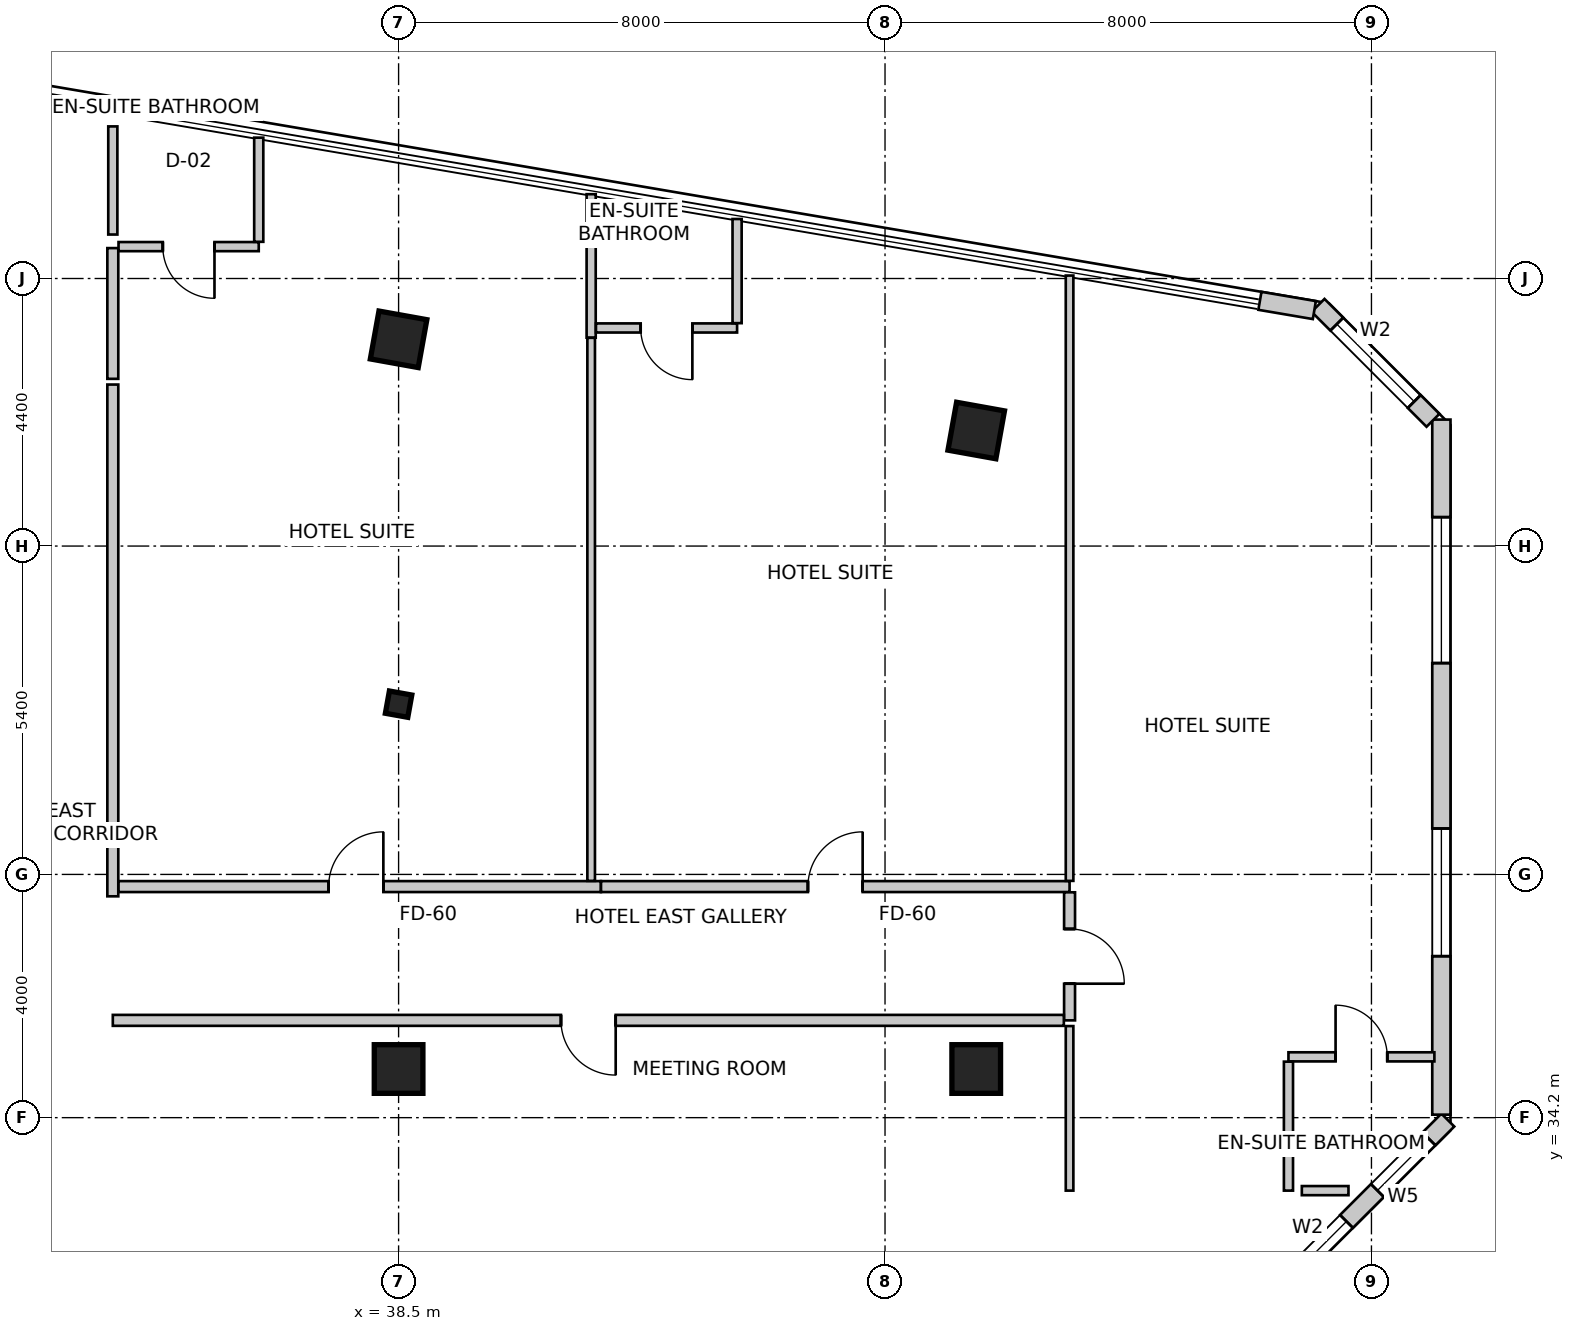
"""IFC4 building model, lengths in metres.
Left out: names, types, materials, properties, quantities, classifications, styles, units other than length and angle.
Written with IfcOpenShell. Run it as: python <this file> out.ifc"""

import sys

from ifc_helpers import new_model, si_unit, direction, frame, frame_2d, origin, origin_2d, place, context, subcontext, project, spatial, rectangle, i_section, extrude, source, transform, mapped, element, fill, save


model = new_model("IFC4")
c1 = context("Model", 3, precision=1e-05, world=origin(), true_north=direction((0.0, 1.0)))
c2 = subcontext(c1, "Body", "Model", "MODEL_VIEW")
j1 = project(units=[si_unit("LENGTHUNIT", "METRE"), si_unit("PLANEANGLEUNIT", "RADIAN")], contexts=[c1])
p1 = place(None, origin())
s1 = spatial("IfcSite", under=j1, at=p1, CompositionType="ELEMENT")
p2 = place(p1, origin())
s2 = spatial("IfcBuilding", under=s1, at=p2, CompositionType="ELEMENT")
p3 = place(p2, frame((0.0, 0.0, 150.2)))
s3 = spatial("IfcBuildingStorey", under=s2, at=p3, CompositionType="ELEMENT", Elevation=150.2)
m1 = source(origin(), c2, "Body", "SweptSolid", [
    extrude(rectangle(XDim=0.8, YDim=0.8, at=origin_2d()), origin(), (0.0, 0.0, 1.0), 3.6),
])
for number, where, z_axis, x_axis in (
    (1, (38.5, 47.0, 0.0), (0.0, 0.0, 1.0), (0.984, -0.177, 0.0)),
    (2, (48.0, 45.5, 0.0), (0.0, 0.0, 1.0), (0.984, -0.177, 0.0)),
    (3, (38.5, 35.0, 0.0), (0.0, 0.0, 1.0), (1.0, 0.0, 0.0)),
    (4, (48.0, 35.0, 0.0), (0.0, 0.0, 1.0), (1.0, 0.0, 0.0)),
):
    element("IfcColumn", number, at=place(p3, frame(where, z_axis=z_axis, x_axis=x_axis)), inside=s3, PredefinedType="COLUMN", context=c2, shape_type="MappedRepresentation", body=[
        mapped(m1, transform((0.0, 0.0, 0.0), scale=1.0)),
    ])
m2 = source(origin(), c2, "Body", "SweptSolid", [
    extrude(i_section(OverallWidth=0.374, OverallDepth=0.372, WebThickness=0.016, FlangeThickness=0.026, FilletRadius=0.015, at=origin_2d()), origin(), (0.0, 0.0, 1.0), 3.6),
])
p4 = place(p3, frame((38.5, 41.0, 0.0), z_axis=(0.0, 0.0, 1.0), x_axis=(0.984195607969, -0.17708474032, 0.0)))
e5 = element("IfcColumn", 5, at=p4, inside=s3, PredefinedType="COLUMN", context=c2, shape_type="MappedRepresentation", body=[
    mapped(m2, transform((0.0, 0.0, 0.0), scale=1.0)),
])
p5 = place(p3, frame((52.476, 30.88, 0.0), z_axis=(0.0, 0.0, 1.0), x_axis=(0.707106781187, 0.707106781187, 0.0)))
e6 = element("IfcWall", 6, at=p5, inside=s3, PredefinedType="SOLIDWALL", context=c2, shape_type="SweptSolid", body=[
    extrude(rectangle(XDim=4.639, YDim=0.3, at=frame_2d((2.319, 0.0))), origin(), (0.0, 0.0, 1.0), 3.35),
])
m3 = source(origin(), c2, "Body", "SweptSolid", [
    extrude(rectangle(XDim=1.8, YDim=2.1, at=frame_2d((0.9, 1.05))), frame((0.0, 0.16, 0.0), z_axis=(0.0, -1.0, 0.0), x_axis=(1.0, 0.0, 0.0)), (0.0, 0.0, 1.0), 0.32),
])
p6 = place(p5, frame((0.482, 0.0, 0.85)))
e7 = element("IfcOpeningElement", 7, at=p6, cuts=e6, PredefinedType="OPENING", context=c2, shape_type="MappedRepresentation", body=[
    mapped(m3, transform((0.0, 0.0, 0.0), scale=1.0)),
])
m4 = source(origin(), c2, "Body", "SweptSolid", [
    extrude(rectangle(XDim=1.2, YDim=1.6, at=frame_2d((0.6, 0.8))), frame((0.0, 0.16, 0.0), z_axis=(0.0, -1.0, 0.0), x_axis=(1.0, 0.0, 0.0)), (0.0, 0.0, 1.0), 0.32),
])
p7 = place(p5, frame((3.001, 0.0, 0.85)))
e8 = element("IfcOpeningElement", 8, at=p7, cuts=e6, PredefinedType="OPENING", context=c2, shape_type="MappedRepresentation", body=[
    mapped(m4, transform((0.0, 0.0, 0.0), scale=1.0)),
])
p8 = place(p3, frame((55.65, 34.249, 0.0), z_axis=(0.0, 0.0, 1.0), x_axis=(0.0, 1.0, 0.0)))
e9 = element("IfcWall", 9, at=p8, inside=s3, PredefinedType="SOLIDWALL", context=c2, shape_type="SweptSolid", body=[
    extrude(rectangle(XDim=11.431, YDim=0.3, at=frame_2d((5.715, 0.0))), origin(), (0.0, 0.0, 1.0), 3.35),
])
m5 = source(origin(), c2, "Body", "SweptSolid", [
    extrude(rectangle(XDim=2.1, YDim=2.0, at=frame_2d((1.05, 1.0))), frame((0.0, 0.16, 0.0), z_axis=(0.0, -1.0, 0.0), x_axis=(1.0, 0.0, 0.0)), (0.0, 0.0, 1.0), 0.32),
])
p9 = place(p8, frame((2.606, 0.0, 0.85)))
e10 = element("IfcOpeningElement", 10, at=p9, cuts=e9, PredefinedType="OPENING", context=c2, shape_type="MappedRepresentation", body=[
    mapped(m5, transform((0.0, 0.0, 0.0), scale=1.0)),
])
m6 = source(origin(), c2, "Body", "SweptSolid", [
    extrude(rectangle(XDim=2.4, YDim=2.2, at=frame_2d((1.2, 1.1))), frame((0.0, 0.16, 0.0), z_axis=(0.0, -1.0, 0.0), x_axis=(1.0, 0.0, 0.0)), (0.0, 0.0, 1.0), 0.32),
])
p10 = place(p8, frame((7.426, 0.0, 0.85)))
e11 = element("IfcOpeningElement", 11, at=p10, cuts=e9, PredefinedType="OPENING", context=c2, shape_type="MappedRepresentation", body=[
    mapped(m6, transform((0.0, 0.0, 0.0), scale=1.0)),
])
p11 = place(p3, frame((55.512, 45.668, 0.0), z_axis=(0.0, 0.0, 1.0), x_axis=(-0.707152443695, 0.707061115729, 0.0)))
e12 = element("IfcWall", 12, at=p11, inside=s3, PredefinedType="SOLIDWALL", context=c2, shape_type="SweptSolid", body=[
    extrude(rectangle(XDim=2.673, YDim=0.3, at=frame_2d((1.337, 0.0))), origin(), (0.0, 0.0, 1.0), 3.35),
])
p12 = place(p11, frame((0.437, 0.0, 0.85)))
e13 = element("IfcOpeningElement", 13, at=p12, cuts=e12, PredefinedType="OPENING", context=c2, shape_type="MappedRepresentation", body=[
    mapped(m3, transform((0.0, 0.0, 0.0), scale=1.0)),
])
p13 = place(p3, frame((53.561, 47.48, 0.0), z_axis=(0.0, 0.0, 1.0), x_axis=(-0.985836300899, 0.167710428506, 0.0)))
e14 = element("IfcWall", 14, at=p13, inside=s3, PredefinedType="SOLIDWALL", context=c2, shape_type="SweptSolid", body=[
    extrude(rectangle(XDim=0.908, YDim=0.3, at=frame_2d((0.454, 0.0))), origin(), (0.0, 0.0, 1.0), 3.35),
])
p14 = place(p3, frame((33.8, 48.5, 0.0), z_axis=(0.0, 0.0, 1.0), x_axis=(0.0, -1.0, 0.0)))
e15 = element("IfcWall", 15, at=p14, inside=s3, PredefinedType="PARTITIONING", context=c2, shape_type="SweptSolid", body=[
    extrude(rectangle(XDim=2.15, YDim=0.18, at=frame_2d((1.075, 0.0))), origin(), (0.0, 0.0, 1.0), 2.492),
])
p15 = place(p3, frame((33.8, 46.256, 0.0), z_axis=(0.0, 0.0, 1.0), x_axis=(0.0, -1.0, 0.0)))
e16 = element("IfcWall", 16, at=p15, inside=s3, PredefinedType="PARTITIONING", context=c2, shape_type="SweptSolid", body=[
    extrude(rectangle(XDim=8.416, YDim=0.18, at=frame_2d((4.208, 0.0))), origin(), (0.0, 0.0, 1.0), 2.879),
])
p16 = place(p3, frame((33.894, 38.0, 0.0), z_axis=(0.0, 0.0, 1.0), x_axis=(1.0, 0.0, 0.0)))
e17 = element("IfcWall", 17, at=p16, inside=s3, PredefinedType="PARTITIONING", context=c2, shape_type="SweptSolid", body=[
    extrude(rectangle(XDim=7.933, YDim=0.18, at=frame_2d((3.966, 0.0))), origin(), (0.0, 0.0, 1.0), 2.803),
])
m7 = source(origin(), c2, "Body", "SweptSolid", [
    extrude(rectangle(XDim=0.9, YDim=2.15, at=frame_2d((0.45, 1.075))), frame((0.0, 0.1, 0.0), z_axis=(0.0, -1.0, 0.0), x_axis=(1.0, 0.0, 0.0)), (0.0, 0.0, 1.0), 0.2),
])
p17 = place(p16, frame((3.455, 0.0, 0.0)))
e18 = element("IfcOpeningElement", 18, at=p17, cuts=e17, PredefinedType="OPENING", context=c2, shape_type="MappedRepresentation", body=[
    mapped(m7, transform((0.0, 0.0, 0.0), scale=1.0)),
])
p18 = place(p3, frame((41.829, 38.0, 0.0), z_axis=(0.0, 0.0, 1.0), x_axis=(1.0, 0.0, 0.0)))
e19 = element("IfcWall", 19, at=p18, inside=s3, PredefinedType="PARTITIONING", context=c2, shape_type="SweptSolid", body=[
    extrude(rectangle(XDim=7.706, YDim=0.18, at=frame_2d((3.853, 0.0))), origin(), (0.0, 0.0, 1.0), 2.803),
])
p19 = place(p18, frame((3.403, 0.0, 0.0)))
e20 = element("IfcOpeningElement", 20, at=p19, cuts=e19, PredefinedType="OPENING", context=c2, shape_type="MappedRepresentation", body=[
    mapped(m7, transform((0.0, 0.0, 0.0), scale=1.0)),
])
p20 = place(p3, frame((49.535, 37.906, 0.0), z_axis=(0.0, 0.0, 1.0), x_axis=(0.0, -1.0, 0.0)))
e21 = element("IfcWall", 21, at=p20, inside=s3, PredefinedType="PARTITIONING", context=c2, shape_type="SweptSolid", body=[
    extrude(rectangle(XDim=2.106, YDim=0.18, at=frame_2d((1.053, 0.0))), origin(), (0.0, 0.0, 1.0), 3.35),
])
p21 = place(p20, frame((0.603, 0.0, 0.0)))
e22 = element("IfcOpeningElement", 22, at=p21, cuts=e21, PredefinedType="OPENING", context=c2, shape_type="MappedRepresentation", body=[
    mapped(m7, transform((0.0, 0.0, 0.0), scale=1.0)),
])
p22 = place(p3, frame((49.441, 35.8, 0.0), z_axis=(0.0, 0.0, 1.0), x_axis=(-1.0, 0.0, 0.0)))
e23 = element("IfcWall", 23, at=p22, inside=s3, PredefinedType="PARTITIONING", context=c2, shape_type="SweptSolid", body=[
    extrude(rectangle(XDim=15.641, YDim=0.18, at=frame_2d((7.82, 0.0))), origin(), (0.0, 0.0, 1.0), 2.803),
])
p23 = place(p22, frame((7.371, 0.0, 0.0)))
e24 = element("IfcOpeningElement", 24, at=p23, cuts=e23, PredefinedType="OPENING", context=c2, shape_type="MappedRepresentation", body=[
    mapped(m7, transform((0.0, 0.0, 0.0), scale=1.0)),
])
p24 = place(p3, frame((36.2, 48.524, 0.0), z_axis=(0.0, 0.0, 1.0), x_axis=(-1.0, 0.0, 0.0)))
e25 = element("IfcWall", 25, at=p24, inside=s3, PredefinedType="PARTITIONING", context=c2, shape_type="SweptSolid", body=[
    extrude(rectangle(XDim=2.306, YDim=0.15, at=frame_2d((1.153, 0.0))), origin(), (0.0, 0.0, 1.0), 3.35),
])
m8 = source(origin(), c2, "Body", "SweptSolid", [
    extrude(rectangle(XDim=0.85, YDim=2.15, at=frame_2d((0.425, 1.075))), frame((0.0, 0.085, 0.0), z_axis=(0.0, -1.0, 0.0), x_axis=(1.0, 0.0, 0.0)), (0.0, 0.0, 1.0), 0.17),
])
p25 = place(p24, frame((0.728, 0.0, 0.0)))
e26 = element("IfcOpeningElement", 26, at=p25, cuts=e25, PredefinedType="OPENING", context=c2, shape_type="MappedRepresentation", body=[
    mapped(m8, transform((0.0, 0.0, 0.0), scale=1.0)),
])
p26 = place(p3, frame((36.2, 50.316, 0.0), z_axis=(0.0, 0.0, 1.0), x_axis=(0.0, -1.0, 0.0)))
e27 = element("IfcWall", 27, at=p26, inside=s3, PredefinedType="PARTITIONING", context=c2, shape_type="SweptSolid", body=[
    extrude(rectangle(XDim=1.713, YDim=0.15, at=frame_2d((0.856, 0.0))), origin(), (0.0, 0.0, 1.0), 3.35),
])
p27 = place(p3, frame((41.667, 49.387, 0.0), z_axis=(0.0, 0.0, 1.0), x_axis=(0.0, -1.0, 0.0)))
e28 = element("IfcWall", 28, at=p27, inside=s3, PredefinedType="PARTITIONING", context=c2, shape_type="SweptSolid", body=[
    extrude(rectangle(XDim=2.36, YDim=0.15, at=frame_2d((1.18, 0.0))), origin(), (0.0, 0.0, 1.0), 3.35),
])
p28 = place(p3, frame((41.667, 47.025, 0.0), z_axis=(0.0, 0.0, 1.0), x_axis=(0.0, -1.0, 0.0)))
e29 = element("IfcWall", 29, at=p28, inside=s3, PredefinedType="PARTITIONING", context=c2, shape_type="SweptSolid", body=[
    extrude(rectangle(XDim=8.931, YDim=0.125, at=frame_2d((4.465, 0.0))), origin(), (0.0, 0.0, 1.0), 2.492),
])
p29 = place(p3, frame((44.067, 47.187, 0.0), z_axis=(0.0, 0.0, 1.0), x_axis=(-1.0, 0.0, 0.0)))
e30 = element("IfcWall", 30, at=p29, inside=s3, PredefinedType="PARTITIONING", context=c2, shape_type="SweptSolid", body=[
    extrude(rectangle(XDim=2.321, YDim=0.15, at=frame_2d((1.16, 0.0))), origin(), (0.0, 0.0, 1.0), 3.35),
])
p30 = place(p29, frame((0.736, 0.0, 0.0)))
e31 = element("IfcOpeningElement", 31, at=p30, cuts=e30, PredefinedType="OPENING", context=c2, shape_type="MappedRepresentation", body=[
    mapped(m8, transform((0.0, 0.0, 0.0), scale=1.0)),
])
p31 = place(p3, frame((44.067, 48.979, 0.0), z_axis=(0.0, 0.0, 1.0), x_axis=(0.0, -1.0, 0.0)))
e32 = element("IfcWall", 32, at=p31, inside=s3, PredefinedType="PARTITIONING", context=c2, shape_type="SweptSolid", body=[
    extrude(rectangle(XDim=1.713, YDim=0.15, at=frame_2d((0.856, 0.0))), origin(), (0.0, 0.0, 1.0), 3.35),
])
p32 = place(p3, frame((49.535, 48.049, 0.0), z_axis=(0.0, 0.0, 1.0), x_axis=(0.0, -1.0, 0.0)))
e33 = element("IfcWall", 33, at=p32, inside=s3, PredefinedType="PARTITIONING", context=c2, shape_type="SweptSolid", body=[
    extrude(rectangle(XDim=9.955, YDim=0.125, at=frame_2d((4.977, 0.0))), origin(), (0.0, 0.0, 1.0), 3.35),
])
p33 = place(p3, frame((53.135, 35.2, 0.0), z_axis=(0.0, 0.0, 1.0), x_axis=(1.0, 0.0, 0.0)))
e34 = element("IfcWall", 34, at=p33, inside=s3, PredefinedType="PARTITIONING", context=c2, shape_type="SweptSolid", body=[
    extrude(rectangle(XDim=2.4, YDim=0.15, at=frame_2d((1.2, 0.0))), origin(), (0.0, 0.0, 1.0), 3.35),
])
p34 = place(p33, frame((0.775, 0.0, 0.0)))
e35 = element("IfcOpeningElement", 35, at=p34, cuts=e34, PredefinedType="OPENING", context=c2, shape_type="MappedRepresentation", body=[
    mapped(m8, transform((0.0, 0.0, 0.0), scale=1.0)),
])
p35 = place(p3, frame((53.135, 33.0, 0.0), z_axis=(0.0, 0.0, 1.0), x_axis=(0.0, 1.0, 0.0)))
e36 = element("IfcWall", 36, at=p35, inside=s3, PredefinedType="PARTITIONING", context=c2, shape_type="SweptSolid", body=[
    extrude(rectangle(XDim=2.121, YDim=0.15, at=frame_2d((1.061, 0.0))), origin(), (0.0, 0.0, 1.0), 3.35),
])
p36 = place(p3, frame((49.535, 33.0, 0.0), z_axis=(0.0, 0.0, 1.0), x_axis=(0.0, 1.0, 0.0)))
e37 = element("IfcWall", 37, at=p36, inside=s3, PredefinedType="PARTITIONING", context=c2, shape_type="SweptSolid", body=[
    extrude(rectangle(XDim=2.706, YDim=0.125, at=frame_2d((1.353, 0.0))), origin(), (0.0, 0.0, 1.0), 3.35),
])
p37 = place(p3, frame((33.8, 48.723, 0.0), z_axis=(0.0, 0.0, 1.0), x_axis=(0.0, 1.0, 0.0)))
e38 = element("IfcWall", 38, at=p37, inside=s3, PredefinedType="PARTITIONING", context=c2, shape_type="SweptSolid", body=[
    extrude(rectangle(XDim=1.778, YDim=0.15, at=frame_2d((0.889, 0.0))), origin(), (0.0, 0.0, 1.0), 3.35),
])
p38 = place(p3, frame((54.122, 33.0, 0.0), z_axis=(0.0, 0.0, 1.0), x_axis=(-1.0, 0.0, 0.0)))
e39 = element("IfcWall", 39, at=p38, inside=s3, PredefinedType="PARTITIONING", context=c2, shape_type="SweptSolid", body=[
    extrude(rectangle(XDim=0.767, YDim=0.15, at=frame_2d((0.384, 0.0))), origin(), (0.0, 0.0, 1.0), 3.35),
])
m9 = source(origin(), c2, "Body", "SweptSolid", [
    extrude(rectangle(XDim=1.8, YDim=2.1, at=frame_2d((0.9, 1.05))), frame((0.0, -0.015, 0.0), z_axis=(0.0, -1.0, 0.0), x_axis=(1.0, 0.0, 0.0)), (0.0, 0.0, 1.0), 0.06),
])
p39 = place(p6, origin())
e40 = element("IfcWindow", 40, at=p39, inside=s3, PartitioningType="SINGLE_PANEL", PredefinedType="WINDOW", context=c2, shape_type="MappedRepresentation", body=[
    mapped(m9, transform((0.0, 0.0, 0.0), scale=1.0)),
])
fill(e7, e40)
m10 = source(origin(), c2, "Body", "SweptSolid", [
    extrude(rectangle(XDim=1.2, YDim=1.6, at=frame_2d((0.6, 0.8))), frame((0.0, -0.015, 0.0), z_axis=(0.0, -1.0, 0.0), x_axis=(1.0, 0.0, 0.0)), (0.0, 0.0, 1.0), 0.06),
])
p40 = place(p7, origin())
e41 = element("IfcWindow", 41, at=p40, inside=s3, PartitioningType="SINGLE_PANEL", PredefinedType="WINDOW", context=c2, shape_type="MappedRepresentation", body=[
    mapped(m10, transform((0.0, 0.0, 0.0), scale=1.0)),
])
fill(e8, e41)
m11 = source(origin(), c2, "Body", "SweptSolid", [
    extrude(rectangle(XDim=2.1, YDim=2.0, at=frame_2d((1.05, 1.0))), frame((0.0, -0.015, 0.0), z_axis=(0.0, -1.0, 0.0), x_axis=(1.0, 0.0, 0.0)), (0.0, 0.0, 1.0), 0.06),
])
p41 = place(p9, origin())
e42 = element("IfcWindow", 42, at=p41, inside=s3, PartitioningType="SINGLE_PANEL", PredefinedType="WINDOW", context=c2, shape_type="MappedRepresentation", body=[
    mapped(m11, transform((0.0, 0.0, 0.0), scale=1.0)),
])
fill(e10, e42)
m12 = source(origin(), c2, "Body", "SweptSolid", [
    extrude(rectangle(XDim=2.4, YDim=2.2, at=frame_2d((1.2, 1.1))), frame((0.0, -0.015, 0.0), z_axis=(0.0, -1.0, 0.0), x_axis=(1.0, 0.0, 0.0)), (0.0, 0.0, 1.0), 0.06),
])
p42 = place(p10, origin())
e43 = element("IfcWindow", 43, at=p42, inside=s3, PartitioningType="SINGLE_PANEL", PredefinedType="WINDOW", context=c2, shape_type="MappedRepresentation", body=[
    mapped(m12, transform((0.0, 0.0, 0.0), scale=1.0)),
])
fill(e11, e43)
p43 = place(p12, origin())
e44 = element("IfcWindow", 44, at=p43, inside=s3, PartitioningType="SINGLE_PANEL", PredefinedType="WINDOW", context=c2, shape_type="MappedRepresentation", body=[
    mapped(m9, transform((0.0, 0.0, 0.0), scale=1.0)),
])
fill(e13, e44)
m13 = source(origin(), c2, "Body", "SweptSolid", [
    extrude(rectangle(XDim=0.85, YDim=2.15, at=frame_2d((0.425, 1.075))), frame((0.0, 0.025, 0.0), z_axis=(0.0, -1.0, 0.0), x_axis=(1.0, 0.0, 0.0)), (0.0, 0.0, 1.0), 0.05),
])
p44 = place(p25, origin())
e45 = element("IfcDoor", 45, at=p44, inside=s3, OperationType="SINGLE_SWING_LEFT", PredefinedType="DOOR", context=c2, shape_type="MappedRepresentation", body=[
    mapped(m13, transform((0.0, 0.0, 0.0), scale=1.0)),
])
fill(e26, e45)
m14 = source(origin(), c2, "Body", "SweptSolid", [
    extrude(rectangle(XDim=0.9, YDim=2.15, at=frame_2d((0.45, 1.075))), frame((0.0, 0.025, 0.0), z_axis=(0.0, -1.0, 0.0), x_axis=(1.0, 0.0, 0.0)), (0.0, 0.0, 1.0), 0.05),
])
p45 = place(p17, origin())
e46 = element("IfcDoor", 46, at=p45, inside=s3, OperationType="SINGLE_SWING_RIGHT", PredefinedType="DOOR", context=c2, shape_type="MappedRepresentation", body=[
    mapped(m14, transform((0.0, 0.0, 0.0), scale=1.0)),
])
fill(e18, e46)
p46 = place(p30, origin())
e47 = element("IfcDoor", 47, at=p46, inside=s3, OperationType="SINGLE_SWING_LEFT", PredefinedType="DOOR", context=c2, shape_type="MappedRepresentation", body=[
    mapped(m13, transform((0.0, 0.0, 0.0), scale=1.0)),
])
fill(e31, e47)
p47 = place(p19, origin())
e48 = element("IfcDoor", 48, at=p47, inside=s3, OperationType="SINGLE_SWING_RIGHT", PredefinedType="DOOR", context=c2, shape_type="MappedRepresentation", body=[
    mapped(m14, transform((0.0, 0.0, 0.0), scale=1.0)),
])
fill(e20, e48)
p48 = place(p34, origin())
e49 = element("IfcDoor", 49, at=p48, inside=s3, OperationType="SINGLE_SWING_LEFT", PredefinedType="DOOR", context=c2, shape_type="MappedRepresentation", body=[
    mapped(m13, transform((0.0, 0.0, 0.0), scale=1.0)),
])
fill(e35, e49)
p49 = place(p21, origin())
e50 = element("IfcDoor", 50, at=p49, inside=s3, OperationType="SINGLE_SWING_RIGHT", PredefinedType="DOOR", context=c2, shape_type="MappedRepresentation", body=[
    mapped(m14, transform((0.0, 0.0, 0.0), scale=1.0)),
])
fill(e22, e50)
m15 = source(origin(), c2, "Body", "SweptSolid", [
    extrude(rectangle(XDim=0.9, YDim=2.15, at=frame_2d((0.45, 1.075))), frame((0.0, 0.025, 0.0), z_axis=(0.0, -1.0, 0.0), x_axis=(1.0, 0.0, 0.0)), (0.0, 0.0, 1.0), 0.05),
])
p50 = place(p23, origin())
e51 = element("IfcDoor", 51, at=p50, inside=s3, OperationType="SINGLE_SWING_LEFT", PredefinedType="DOOR", context=c2, shape_type="MappedRepresentation", body=[
    mapped(m15, transform((0.0, 0.0, 0.0), scale=1.0)),
])
fill(e24, e51)
save(model, sys.argv[1])
